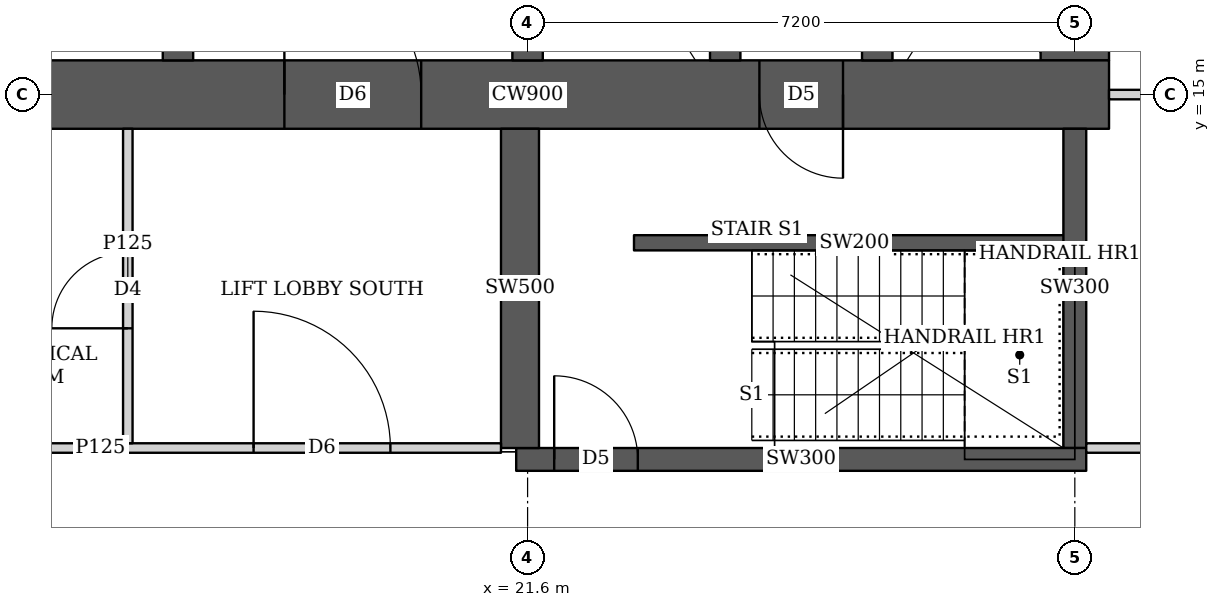
"""IFC4 building model, lengths in metres.
Left out: names, types, materials, properties, quantities, classifications, styles, units other than length and angle.
Written with IfcOpenShell. Run it as: python <this file> out.ifc"""

import sys

from ifc_helpers import new_model, si_unit, direction, frame, frame_2d, origin, place, context, subcontext, project, spatial, rectangle, extrude, element, fill, save


model = new_model("IFC4")
c1 = context("Model", 3, precision=1e-05, world=origin(), true_north=direction((0.0, 1.0)))
c2 = subcontext(c1, "Body", "Model", "MODEL_VIEW")
j1 = project(units=[si_unit("LENGTHUNIT", "METRE"), si_unit("PLANEANGLEUNIT", "RADIAN")], contexts=[c1])
p1 = place(None, origin())
s1 = spatial("IfcSite", under=j1, at=p1, CompositionType="ELEMENT")
p2 = place(p1, origin())
s2 = spatial("IfcBuilding", under=s1, at=p2, CompositionType="ELEMENT")
p3 = place(p2, frame((0.0, 0.0, 212.45)))
s3 = spatial("IfcBuildingStorey", under=s2, at=p3, CompositionType="ELEMENT", Elevation=212.45)
p4 = place(p3, frame((13.95, 15.0, 0.0), z_axis=(0.0, 0.0, 1.0), x_axis=(1.0, 0.0, 0.0)))
e1 = element("IfcWall", 1, at=p4, inside=s3, PredefinedType="SHEAR", context=c2, shape_type="SweptSolid", body=[
    extrude(rectangle(XDim=15.3, YDim=0.9, at=frame_2d((7.65, 0.0))), origin(), (0.0, 0.0, 1.0), 3.75),
])
p5 = place(p4, frame((4.45, 0.0, 0.0)))
e2 = element("IfcOpeningElement", 2, at=p5, cuts=e1, PredefinedType="OPENING", context=c2, shape_type="SweptSolid", body=[
    extrude(rectangle(XDim=1.8, YDim=2.1, at=frame_2d((0.9, 1.05))), frame((0.0, 0.46, 0.0), z_axis=(0.0, -1.0, 0.0), x_axis=(1.0, 0.0, 0.0)), (0.0, 0.0, 1.0), 0.92),
])
p6 = place(p4, frame((10.7, 0.0, 0.0)))
e3 = element("IfcOpeningElement", 3, at=p6, cuts=e1, PredefinedType="OPENING", context=c2, shape_type="SweptSolid", body=[
    extrude(rectangle(XDim=1.1, YDim=2.1, at=frame_2d((0.55, 1.05))), frame((0.0, 0.46, 0.0), z_axis=(0.0, -1.0, 0.0), x_axis=(1.0, 0.0, 0.0)), (0.0, 0.0, 1.0), 0.92),
])
p7 = place(p3, frame((28.8, 15.45, 0.0), z_axis=(0.0, 0.0, 1.0), x_axis=(0.0, 1.0, 0.0)))
e4 = element("IfcWall", 4, at=p7, inside=s3, PredefinedType="SHEAR", context=c2, shape_type="SweptSolid", body=[
    extrude(rectangle(XDim=14.1, YDim=0.9, at=frame_2d((7.05, 0.0))), origin(), (0.0, 0.0, 1.0), 3.75),
])
p8 = place(p3, frame((17.0, 15.45, 0.0), z_axis=(0.0, 0.0, 1.0), x_axis=(0.0, 1.0, 0.0)))
e5 = element("IfcWall", 5, at=p8, inside=s3, PredefinedType="SHEAR", context=c2, shape_type="SweptSolid", body=[
    extrude(rectangle(XDim=14.1, YDim=0.4, at=frame_2d((7.05, 0.0))), origin(), (0.0, 0.0, 1.0), 3.75),
])
p9 = place(p8, frame((0.925, 0.0, 0.0)))
e6 = element("IfcOpeningElement", 6, at=p9, cuts=e5, PredefinedType="OPENING", context=c2, shape_type="SweptSolid", body=[
    extrude(rectangle(XDim=1.0, YDim=2.1, at=frame_2d((0.5, 1.05))), frame((0.0, 0.21, 0.0), z_axis=(0.0, -1.0, 0.0), x_axis=(1.0, 0.0, 0.0)), (0.0, 0.0, 1.0), 0.42),
])
p10 = place(p8, frame((4.675, 0.0, 0.0)))
e7 = element("IfcOpeningElement", 7, at=p10, cuts=e5, PredefinedType="OPENING", context=c2, shape_type="SweptSolid", body=[
    extrude(rectangle(XDim=1.0, YDim=2.1, at=frame_2d((0.5, 1.05))), frame((0.0, 0.21, 0.0), z_axis=(0.0, -1.0, 0.0), x_axis=(1.0, 0.0, 0.0)), (0.0, 0.0, 1.0), 0.42),
])
p11 = place(p8, frame((8.425, 0.0, 0.0)))
e8 = element("IfcOpeningElement", 8, at=p11, cuts=e5, PredefinedType="OPENING", context=c2, shape_type="SweptSolid", body=[
    extrude(rectangle(XDim=1.0, YDim=2.1, at=frame_2d((0.5, 1.05))), frame((0.0, 0.21, 0.0), z_axis=(0.0, -1.0, 0.0), x_axis=(1.0, 0.0, 0.0)), (0.0, 0.0, 1.0), 0.42),
])
p12 = place(p8, frame((12.175, 0.0, 0.0)))
e9 = element("IfcOpeningElement", 9, at=p12, cuts=e5, PredefinedType="OPENING", context=c2, shape_type="SweptSolid", body=[
    extrude(rectangle(XDim=1.0, YDim=2.1, at=frame_2d((0.5, 1.05))), frame((0.0, 0.21, 0.0), z_axis=(0.0, -1.0, 0.0), x_axis=(1.0, 0.0, 0.0)), (0.0, 0.0, 1.0), 0.42),
])
p13 = place(p3, frame((21.6, 15.45, 0.0), z_axis=(0.0, 0.0, 1.0), x_axis=(0.0, 1.0, 0.0)))
e10 = element("IfcWall", 10, at=p13, inside=s3, PredefinedType="SHEAR", context=c2, shape_type="SweptSolid", body=[
    extrude(rectangle(XDim=14.1, YDim=0.4, at=frame_2d((7.05, 0.0))), origin(), (0.0, 0.0, 1.0), 3.75),
])
p14 = place(p13, frame((0.875, 0.0, 0.0)))
e11 = element("IfcOpeningElement", 11, at=p14, cuts=e10, PredefinedType="OPENING", context=c2, shape_type="SweptSolid", body=[
    extrude(rectangle(XDim=1.1, YDim=2.1, at=frame_2d((0.55, 1.05))), frame((0.0, 0.21, 0.0), z_axis=(0.0, -1.0, 0.0), x_axis=(1.0, 0.0, 0.0)), (0.0, 0.0, 1.0), 0.42),
])
p15 = place(p13, frame((4.625, 0.0, 0.0)))
e12 = element("IfcOpeningElement", 12, at=p15, cuts=e10, PredefinedType="OPENING", context=c2, shape_type="SweptSolid", body=[
    extrude(rectangle(XDim=1.1, YDim=2.1, at=frame_2d((0.55, 1.05))), frame((0.0, 0.21, 0.0), z_axis=(0.0, -1.0, 0.0), x_axis=(1.0, 0.0, 0.0)), (0.0, 0.0, 1.0), 0.42),
])
p16 = place(p13, frame((8.375, 0.0, 0.0)))
e13 = element("IfcOpeningElement", 13, at=p16, cuts=e10, PredefinedType="OPENING", context=c2, shape_type="SweptSolid", body=[
    extrude(rectangle(XDim=1.1, YDim=2.1, at=frame_2d((0.55, 1.05))), frame((0.0, 0.21, 0.0), z_axis=(0.0, -1.0, 0.0), x_axis=(1.0, 0.0, 0.0)), (0.0, 0.0, 1.0), 0.42),
])
p17 = place(p13, frame((12.125, 0.0, 0.0)))
e14 = element("IfcOpeningElement", 14, at=p17, cuts=e10, PredefinedType="OPENING", context=c2, shape_type="SweptSolid", body=[
    extrude(rectangle(XDim=1.1, YDim=2.1, at=frame_2d((0.55, 1.05))), frame((0.0, 0.21, 0.0), z_axis=(0.0, -1.0, 0.0), x_axis=(1.0, 0.0, 0.0)), (0.0, 0.0, 1.0), 0.42),
])
p18 = place(p3, frame((24.2, 15.45, 0.0), z_axis=(0.0, 0.0, 1.0), x_axis=(0.0, 1.0, 0.0)))
e15 = element("IfcWall", 15, at=p18, inside=s3, PredefinedType="SHEAR", context=c2, shape_type="SweptSolid", body=[
    extrude(rectangle(XDim=14.1, YDim=0.4, at=frame_2d((7.05, 0.0))), origin(), (0.0, 0.0, 1.0), 3.75),
])
p19 = place(p3, frame((26.2, 15.45, 0.0), z_axis=(0.0, 0.0, 1.0), x_axis=(0.0, 1.0, 0.0)))
e16 = element("IfcWall", 16, at=p19, inside=s3, PredefinedType="SHEAR", context=c2, shape_type="SweptSolid", body=[
    extrude(rectangle(XDim=3.1, YDim=0.4, at=frame_2d((1.55, 0.0))), origin(), (0.0, 0.0, 1.0), 3.75),
])
p20 = place(p19, frame((0.825, 0.0, 0.0)))
e17 = element("IfcOpeningElement", 17, at=p20, cuts=e16, PredefinedType="OPENING", context=c2, shape_type="SweptSolid", body=[
    extrude(rectangle(XDim=1.2, YDim=2.1, at=frame_2d((0.6, 1.05))), frame((0.0, 0.21, 0.0), z_axis=(0.0, -1.0, 0.0), x_axis=(1.0, 0.0, 0.0)), (0.0, 0.0, 1.0), 0.42),
])
p21 = place(p3, frame((21.45, 10.2, 0.0), z_axis=(0.0, 0.0, 1.0), x_axis=(1.0, 0.0, 0.0)))
e18 = element("IfcWall", 18, at=p21, inside=s3, PredefinedType="SHEAR", context=c2, shape_type="SweptSolid", body=[
    extrude(rectangle(XDim=7.5, YDim=0.3, at=frame_2d((3.75, 0.0))), origin(), (0.0, 0.0, 1.0), 3.75),
])
p22 = place(p21, frame((0.5, 0.0, 0.0)))
e19 = element("IfcOpeningElement", 19, at=p22, cuts=e18, PredefinedType="OPENING", context=c2, shape_type="SweptSolid", body=[
    extrude(rectangle(XDim=1.1, YDim=2.1, at=frame_2d((0.55, 1.05))), frame((0.0, 0.16, 0.0), z_axis=(0.0, -1.0, 0.0), x_axis=(1.0, 0.0, 0.0)), (0.0, 0.0, 1.0), 0.32),
])
p23 = place(p3, frame((21.5, 10.35, 0.0), z_axis=(0.0, 0.0, 1.0), x_axis=(0.0, 1.0, 0.0)))
e20 = element("IfcWall", 20, at=p23, inside=s3, PredefinedType="SHEAR", context=c2, shape_type="SweptSolid", body=[
    extrude(rectangle(XDim=4.2, YDim=0.5, at=frame_2d((2.1, 0.0))), origin(), (0.0, 0.0, 1.0), 3.75),
])
p24 = place(p3, frame((28.8, 10.35, 0.0), z_axis=(0.0, 0.0, 1.0), x_axis=(0.0, 1.0, 0.0)))
e21 = element("IfcWall", 21, at=p24, inside=s3, PredefinedType="SHEAR", context=c2, shape_type="SweptSolid", body=[
    extrude(rectangle(XDim=4.2, YDim=0.3, at=frame_2d((2.1, 0.0))), origin(), (0.0, 0.0, 1.0), 3.75),
])
p25 = place(p3, frame((10.713, 10.35, 0.0), z_axis=(0.0, 0.0, 1.0), x_axis=(1.0, 0.0, 0.0)))
e22 = element("IfcWall", 22, at=p25, inside=s3, PredefinedType="PARTITIONING", context=c2, shape_type="SweptSolid", body=[
    extrude(rectangle(XDim=10.537, YDim=0.125, at=frame_2d((5.269, 0.0))), origin(), (0.0, 0.0, 1.0), 3.5),
])
p26 = place(p25, frame((7.282, 0.0, 0.0)))
e23 = element("IfcOpeningElement", 23, at=p26, cuts=e22, PredefinedType="OPENING", context=c2, shape_type="SweptSolid", body=[
    extrude(rectangle(XDim=1.8, YDim=2.1, at=frame_2d((0.9, 1.05))), frame((0.0, 0.073, 0.0), z_axis=(0.0, -1.0, 0.0), x_axis=(1.0, 0.0, 0.0)), (0.0, 0.0, 1.0), 0.145),
])
p27 = place(p3, frame((16.34, 10.413, 0.0), z_axis=(0.0, 0.0, 1.0), x_axis=(0.0, 1.0, 0.0)))
e24 = element("IfcWall", 24, at=p27, inside=s3, PredefinedType="PARTITIONING", context=c2, shape_type="SweptSolid", body=[
    extrude(rectangle(XDim=4.137, YDim=0.125, at=frame_2d((2.068, 0.0))), origin(), (0.0, 0.0, 1.0), 3.5),
])
p28 = place(p27, frame((1.512, 0.0, 0.0)))
e25 = element("IfcOpeningElement", 25, at=p28, cuts=e24, PredefinedType="OPENING", context=c2, shape_type="SweptSolid", body=[
    extrude(rectangle(XDim=1.0, YDim=2.1, at=frame_2d((0.5, 1.05))), frame((0.0, 0.073, 0.0), z_axis=(0.0, -1.0, 0.0), x_axis=(1.0, 0.0, 0.0)), (0.0, 0.0, 1.0), 0.145),
])
p29 = place(p3, frame((28.95, 10.35, 0.0), z_axis=(0.0, 0.0, 1.0), x_axis=(1.0, 0.0, 0.0)))
e26 = element("IfcWall", 26, at=p29, inside=s3, PredefinedType="PARTITIONING", context=c2, shape_type="SweptSolid", body=[
    extrude(rectangle(XDim=8.886, YDim=0.125, at=frame_2d((4.443, 0.0))), origin(), (0.0, 0.0, 1.0), 3.5),
])
p30 = place(p3, frame((29.25, 15.0, 0.0), z_axis=(0.0, 0.0, 1.0), x_axis=(1.0, 0.0, 0.0)))
e27 = element("IfcWall", 27, at=p30, inside=s3, PredefinedType="PARTITIONING", context=c2, shape_type="SweptSolid", body=[
    extrude(rectangle(XDim=6.049, YDim=0.125, at=frame_2d((3.024, 0.0))), origin(), (0.0, 0.0, 1.0), 3.5),
])
p31 = place(p3, frame((23.0, 13.05, 0.0), z_axis=(0.0, 0.0, 1.0), x_axis=(1.0, 0.0, 0.0)))
e28 = element("IfcWall", 28, at=p31, inside=s3, PredefinedType="SHEAR", context=c2, shape_type="SweptSolid", body=[
    extrude(rectangle(XDim=5.8, YDim=0.2, at=frame_2d((2.9, 0.0))), origin(), (0.0, 0.0, 1.0), 3.75),
])
p32 = place(p28, origin())
e29 = element("IfcDoor", 29, at=p32, inside=s3, OperationType="SINGLE_SWING_LEFT", PredefinedType="DOOR", context=c2, shape_type="SweptSolid", body=[
    extrude(rectangle(XDim=1.0, YDim=2.1, at=frame_2d((0.5, 1.05))), frame((0.0, 0.025, 0.0), z_axis=(0.0, -1.0, 0.0), x_axis=(1.0, 0.0, 0.0)), (0.0, 0.0, 1.0), 0.05),
])
fill(e25, e29)
p33 = place(p26, origin())
e30 = element("IfcDoor", 30, at=p33, inside=s3, OperationType="DOUBLE_DOOR_SINGLE_SWING", PredefinedType="DOOR", context=c2, shape_type="SweptSolid", body=[
    extrude(rectangle(XDim=1.8, YDim=2.1, at=frame_2d((0.9, 1.05))), frame((0.0, 0.025, 0.0), z_axis=(0.0, -1.0, 0.0), x_axis=(1.0, 0.0, 0.0)), (0.0, 0.0, 1.0), 0.05),
])
fill(e23, e30)
p34 = place(p5, origin())
e31 = element("IfcDoor", 31, at=p34, inside=s3, OperationType="DOUBLE_DOOR_SINGLE_SWING", PredefinedType="DOOR", context=c2, shape_type="SweptSolid", body=[
    extrude(rectangle(XDim=1.8, YDim=2.1, at=frame_2d((0.9, 1.05))), frame((0.0, 0.025, 0.0), z_axis=(0.0, -1.0, 0.0), x_axis=(1.0, 0.0, 0.0)), (0.0, 0.0, 1.0), 0.05),
])
fill(e2, e31)
p35 = place(p6, origin())
e32 = element("IfcDoor", 32, at=p35, inside=s3, OperationType="SINGLE_SWING_LEFT", PredefinedType="DOOR", context=c2, shape_type="SweptSolid", body=[
    extrude(rectangle(XDim=1.1, YDim=2.1, at=frame_2d((0.55, 1.05))), frame((0.0, 0.025, 0.0), z_axis=(0.0, -1.0, 0.0), x_axis=(1.0, 0.0, 0.0)), (0.0, 0.0, 1.0), 0.05),
])
fill(e3, e32)
p36 = place(p22, origin())
e33 = element("IfcDoor", 33, at=p36, inside=s3, OperationType="SINGLE_SWING_LEFT", PredefinedType="DOOR", context=c2, shape_type="SweptSolid", body=[
    extrude(rectangle(XDim=1.1, YDim=2.1, at=frame_2d((0.55, 1.05))), frame((0.0, 0.025, 0.0), z_axis=(0.0, -1.0, 0.0), x_axis=(1.0, 0.0, 0.0)), (0.0, 0.0, 1.0), 0.05),
])
fill(e19, e33)
save(model, sys.argv[1])
